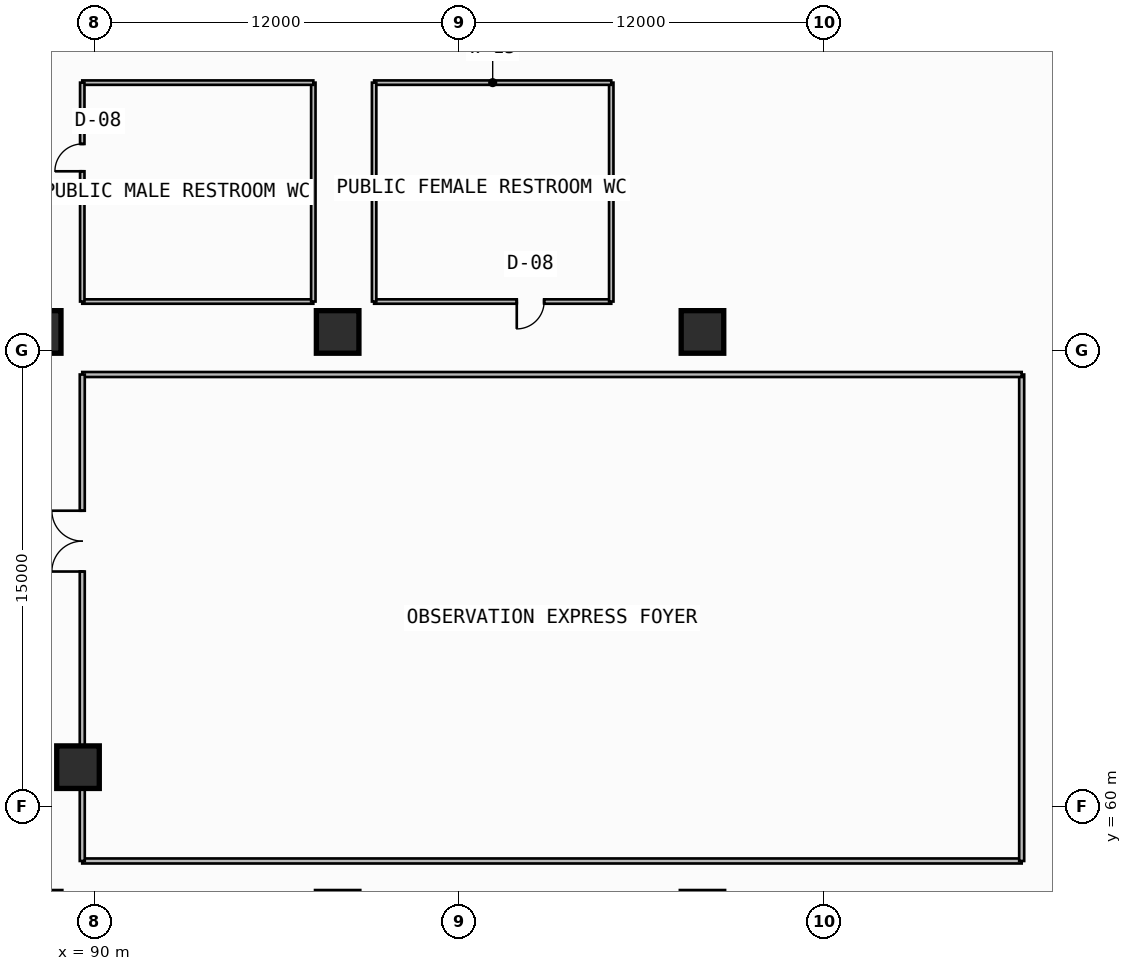
"""IFC4 building model, lengths in metres.
Left out: names, types, materials, properties, quantities, classifications, styles, units other than length and angle.
Written with IfcOpenShell. Run it as: python <this file> out.ifc"""

import sys

from ifc_helpers import new_model, si_unit, direction, frame, frame_2d, origin, origin_2d, place, context, subcontext, project, spatial, rectangle, extrude, element, fill, save


model = new_model("IFC4")
c1 = context("Model", 3, precision=1e-05, world=origin(), true_north=direction((0.0, 1.0)))
c2 = subcontext(c1, "Body", "Model", "MODEL_VIEW")
j1 = project(units=[si_unit("LENGTHUNIT", "METRE"), si_unit("PLANEANGLEUNIT", "RADIAN")], contexts=[c1])
p1 = place(None, origin())
s1 = spatial("IfcSite", under=j1, at=p1, CompositionType="ELEMENT")
p2 = place(p1, origin())
s2 = spatial("IfcBuilding", under=s1, at=p2, CompositionType="ELEMENT")
p3 = place(p2, origin())
s3 = spatial("IfcBuildingStorey", under=s2, at=p3, CompositionType="ELEMENT", Elevation=0.0)
for number, where, z_axis, x_axis in (
    (1, (88.2, 75.6, 0.0), (0.0, 0.0, 1.0), (1.0, 0.0, 0.0)),
    (2, (98.0, 75.6, 0.0), (0.0, 0.0, 1.0), (1.0, 0.0, 0.0)),
    (3, (110.0, 75.6, 0.0), (0.0, 0.0, 1.0), (1.0, 0.0, 0.0)),
    (4, (89.46, 61.285, 0.0), (0.0, 0.0, 1.0), (1.0, 0.0, 0.0)),
):
    element("IfcColumn", number, at=place(p3, frame(where, z_axis=z_axis, x_axis=x_axis)), inside=s3, PredefinedType="COLUMN", context=c2, shape_type="SweptSolid", body=[
        extrude(rectangle(XDim=1.4, YDim=1.4, at=origin_2d()), origin(), (0.0, 0.0, 1.0), 4.5),
    ])
p4 = place(p3, frame((89.6, 58.2, 0.0), z_axis=(0.0, 0.0, 1.0), x_axis=(1.0, 0.0, 0.0)))
e5 = element("IfcWall", 5, at=p4, inside=s3, PredefinedType="PARTITIONING", context=c2, shape_type="SweptSolid", body=[
    extrude(rectangle(XDim=30.9, YDim=0.165, at=frame_2d((15.45, 0.0))), origin(), (0.0, 0.0, 1.0), 3.465),
])
p5 = place(p3, frame((120.5, 58.2, 0.0), z_axis=(0.0, 0.0, 1.0), x_axis=(0.0, 1.0, 0.0)))
e6 = element("IfcWall", 6, at=p5, inside=s3, PredefinedType="PARTITIONING", context=c2, shape_type="SweptSolid", body=[
    extrude(rectangle(XDim=16.0, YDim=0.165, at=frame_2d((8.0, 0.0))), origin(), (0.0, 0.0, 1.0), 4.18),
])
p6 = place(p3, frame((120.5, 74.2, 0.0), z_axis=(0.0, 0.0, 1.0), x_axis=(-1.0, 0.0, 0.0)))
e7 = element("IfcWall", 7, at=p6, inside=s3, PredefinedType="PARTITIONING", context=c2, shape_type="SweptSolid", body=[
    extrude(rectangle(XDim=30.9, YDim=0.165, at=frame_2d((15.45, 0.0))), origin(), (0.0, 0.0, 1.0), 3.465),
])
p7 = place(p3, frame((89.6, 74.2, 0.0), z_axis=(0.0, 0.0, 1.0), x_axis=(0.0, -1.0, 0.0)))
e8 = element("IfcWall", 8, at=p7, inside=s3, PredefinedType="PARTITIONING", context=c2, shape_type="SweptSolid", body=[
    extrude(rectangle(XDim=16.0, YDim=0.165, at=frame_2d((8.0, 0.0))), origin(), (0.0, 0.0, 1.0), 4.18),
])
p8 = place(p7, frame((4.48, 0.0, 0.0)))
e9 = element("IfcOpeningElement", 9, at=p8, cuts=e8, PredefinedType="OPENING", context=c2, shape_type="SweptSolid", body=[
    extrude(rectangle(XDim=2.0, YDim=2.6, at=frame_2d((1.0, 1.3))), frame((0.0, 0.093, 0.0), z_axis=(0.0, -1.0, 0.0), x_axis=(1.0, 0.0, 0.0)), (0.0, 0.0, 1.0), 0.185),
])
p9 = place(p3, frame((89.6, 76.6, 0.0), z_axis=(0.0, 0.0, 1.0), x_axis=(1.0, 0.0, 0.0)))
e10 = element("IfcWall", 10, at=p9, inside=s3, PredefinedType="PARTITIONING", context=c2, shape_type="SweptSolid", body=[
    extrude(rectangle(XDim=7.6, YDim=0.145, at=frame_2d((3.8, 0.0))), origin(), (0.0, 0.0, 1.0), 3.665),
])
p10 = place(p3, frame((97.2, 76.6, 0.0), z_axis=(0.0, 0.0, 1.0), x_axis=(0.0, 1.0, 0.0)))
e11 = element("IfcWall", 11, at=p10, inside=s3, PredefinedType="PARTITIONING", context=c2, shape_type="SweptSolid", body=[
    extrude(rectangle(XDim=7.2, YDim=0.145, at=frame_2d((3.6, 0.0))), origin(), (0.0, 0.0, 1.0), 4.18),
])
p11 = place(p3, frame((97.2, 83.8, 0.0), z_axis=(0.0, 0.0, 1.0), x_axis=(-1.0, 0.0, 0.0)))
e12 = element("IfcWall", 12, at=p11, inside=s3, PredefinedType="PARTITIONING", context=c2, shape_type="SweptSolid", body=[
    extrude(rectangle(XDim=7.6, YDim=0.145, at=frame_2d((3.8, 0.0))), origin(), (0.0, 0.0, 1.0), 3.665),
])
p12 = place(p3, frame((89.6, 83.8, 0.0), z_axis=(0.0, 0.0, 1.0), x_axis=(0.0, -1.0, 0.0)))
e13 = element("IfcWall", 13, at=p12, inside=s3, PredefinedType="PARTITIONING", context=c2, shape_type="SweptSolid", body=[
    extrude(rectangle(XDim=7.2, YDim=0.145, at=frame_2d((3.6, 0.0))), origin(), (0.0, 0.0, 1.0), 4.18),
])
p13 = place(p12, frame((2.016, 0.0, 0.0)))
e14 = element("IfcOpeningElement", 14, at=p13, cuts=e13, PredefinedType="OPENING", context=c2, shape_type="SweptSolid", body=[
    extrude(rectangle(XDim=0.9, YDim=2.1, at=frame_2d((0.45, 1.05))), frame((0.0, 0.083, 0.0), z_axis=(0.0, -1.0, 0.0), x_axis=(1.0, 0.0, 0.0)), (0.0, 0.0, 1.0), 0.165),
])
p14 = place(p3, frame((99.2, 76.6, 0.0), z_axis=(0.0, 0.0, 1.0), x_axis=(1.0, 0.0, 0.0)))
e15 = element("IfcWall", 15, at=p14, inside=s3, PredefinedType="PARTITIONING", context=c2, shape_type="SweptSolid", body=[
    extrude(rectangle(XDim=7.8, YDim=0.145, at=frame_2d((3.9, 0.0))), origin(), (0.0, 0.0, 1.0), 3.665),
])
p15 = place(p14, frame((4.692, 0.0, 0.0)))
e16 = element("IfcOpeningElement", 16, at=p15, cuts=e15, PredefinedType="OPENING", context=c2, shape_type="SweptSolid", body=[
    extrude(rectangle(XDim=0.9, YDim=2.1, at=frame_2d((0.45, 1.05))), frame((0.0, 0.083, 0.0), z_axis=(0.0, -1.0, 0.0), x_axis=(1.0, 0.0, 0.0)), (0.0, 0.0, 1.0), 0.165),
])
p16 = place(p3, frame((107.0, 76.6, 0.0), z_axis=(0.0, 0.0, 1.0), x_axis=(0.0, 1.0, 0.0)))
e17 = element("IfcWall", 17, at=p16, inside=s3, PredefinedType="PARTITIONING", context=c2, shape_type="SweptSolid", body=[
    extrude(rectangle(XDim=7.2, YDim=0.145, at=frame_2d((3.6, 0.0))), origin(), (0.0, 0.0, 1.0), 4.18),
])
p17 = place(p3, frame((107.0, 83.8, 0.0), z_axis=(0.0, 0.0, 1.0), x_axis=(-1.0, 0.0, 0.0)))
e18 = element("IfcWall", 18, at=p17, inside=s3, PredefinedType="PARTITIONING", context=c2, shape_type="SweptSolid", body=[
    extrude(rectangle(XDim=7.8, YDim=0.145, at=frame_2d((3.9, 0.0))), origin(), (0.0, 0.0, 1.0), 3.665),
])
p18 = place(p3, frame((99.2, 83.8, 0.0), z_axis=(0.0, 0.0, 1.0), x_axis=(0.0, -1.0, 0.0)))
e19 = element("IfcWall", 19, at=p18, inside=s3, PredefinedType="PARTITIONING", context=c2, shape_type="SweptSolid", body=[
    extrude(rectangle(XDim=7.2, YDim=0.145, at=frame_2d((3.6, 0.0))), origin(), (0.0, 0.0, 1.0), 4.18),
])
p19 = place(p8, frame((2.0, 0.0, 0.0), z_axis=(0.0, 0.0, 1.0), x_axis=(-1.0, 0.0, 0.0)))
e20 = element("IfcDoor", 20, at=p19, inside=s3, OperationType="DOUBLE_DOOR_SINGLE_SWING", PredefinedType="DOOR", context=c2, shape_type="SweptSolid", body=[
    extrude(rectangle(XDim=2.0, YDim=2.6, at=frame_2d((1.0, 1.3))), frame((0.0, 0.025, 0.0), z_axis=(0.0, -1.0, 0.0), x_axis=(1.0, 0.0, 0.0)), (0.0, 0.0, 1.0), 0.05),
])
fill(e9, e20)
p20 = place(p13, frame((0.9, 0.0, 0.0), z_axis=(0.0, 0.0, 1.0), x_axis=(-1.0, 0.0, 0.0)))
e21 = element("IfcDoor", 21, at=p20, inside=s3, OperationType="SINGLE_SWING_LEFT", PredefinedType="DOOR", context=c2, shape_type="SweptSolid", body=[
    extrude(rectangle(XDim=0.9, YDim=2.1, at=frame_2d((0.45, 1.05))), frame((0.0, 0.025, 0.0), z_axis=(0.0, -1.0, 0.0), x_axis=(1.0, 0.0, 0.0)), (0.0, 0.0, 1.0), 0.05),
])
fill(e14, e21)
p21 = place(p15, frame((0.9, 0.0, 0.0), z_axis=(0.0, 0.0, 1.0), x_axis=(-1.0, 0.0, 0.0)))
e22 = element("IfcDoor", 22, at=p21, inside=s3, OperationType="SINGLE_SWING_RIGHT", PredefinedType="DOOR", context=c2, shape_type="SweptSolid", body=[
    extrude(rectangle(XDim=0.9, YDim=2.1, at=frame_2d((0.45, 1.05))), frame((0.0, 0.025, 0.0), z_axis=(0.0, -1.0, 0.0), x_axis=(1.0, 0.0, 0.0)), (0.0, 0.0, 1.0), 0.05),
])
fill(e16, e22)
save(model, sys.argv[1])
